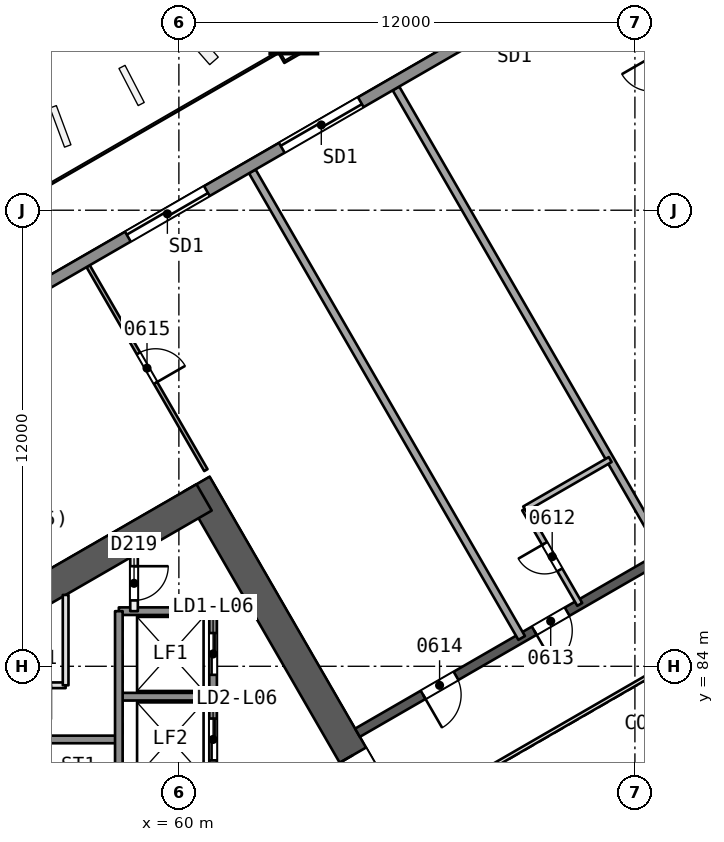
"""IFC4 building model, lengths in metres.
Left out: names, types, materials, properties, quantities, classifications, styles, units other than length and angle.
Written with IfcOpenShell. Run it as: python <this file> out.ifc"""

import sys

from ifc_helpers import new_model, si_unit, direction, frame, frame_2d, origin, origin_2d, place, context, subcontext, project, spatial, rectangle, extrude, element, fill, save


model = new_model("IFC4")
c1 = context("Model", 3, precision=1e-05, world=origin(), true_north=direction((0.0, 1.0)))
c2 = subcontext(c1, "Body", "Model", "MODEL_VIEW")
j1 = project(units=[si_unit("LENGTHUNIT", "METRE"), si_unit("PLANEANGLEUNIT", "RADIAN")], contexts=[c1])
p1 = place(None, origin())
s1 = spatial("IfcSite", under=j1, at=p1, CompositionType="ELEMENT")
p2 = place(p1, origin())
s2 = spatial("IfcBuilding", under=s1, at=p2, CompositionType="ELEMENT")
p3 = place(p2, frame((0.0, 0.0, 33.7)))
s3 = spatial("IfcBuildingStorey", under=s2, at=p3, CompositionType="ELEMENT", Elevation=33.7)
p4 = place(p3, frame((65.538, 80.0, 0.0), z_axis=(0.0, 0.0, 1.0), x_axis=(-0.49999662545, 0.866027352073, 0.0)))
e1 = element("IfcWall", 1, at=p4, inside=s3, PredefinedType="SHEAR", context=c2, shape_type="SweptSolid", body=[
    extrude(rectangle(XDim=10.149, YDim=0.8, at=frame_2d((5.074, 0.0))), origin(), (0.0, 0.0, 1.0), 3.7),
])
p5 = place(p4, frame((0.719, 0.0, 0.0)))
e2 = element("IfcOpeningElement", 2, at=p5, cuts=e1, PredefinedType="OPENING", context=c2, shape_type="SweptSolid", body=[
    extrude(rectangle(XDim=1.2, YDim=2.1, at=frame_2d((0.6, 1.05))), frame((0.0, 0.411, 0.0), z_axis=(0.0, -1.0, 0.0), x_axis=(1.0, 0.0, 0.0)), (0.0, 0.0, 1.0), 0.821),
])
p6 = place(p3, frame((60.664, 88.443, 0.0), z_axis=(0.0, 0.0, 1.0), x_axis=(-0.866029478545, -0.499992942241, 0.0)))
e3 = element("IfcWall", 3, at=p6, inside=s3, PredefinedType="SHEAR", context=c2, shape_type="SweptSolid", body=[
    extrude(rectangle(XDim=13.933, YDim=0.8, at=frame_2d((6.967, 0.0))), origin(), (0.0, 0.0, 1.0), 3.7),
])
p7 = place(p3, frame((78.2, 90.046, 0.0), z_axis=(0.0, 0.0, 1.0), x_axis=(-0.866026492143, -0.499998114903, 0.0)))
e4 = element("IfcWall", 4, at=p7, inside=s3, PredefinedType="SHEAR", context=c2, shape_type="SweptSolid", body=[
    extrude(rectangle(XDim=15.588, YDim=0.25, at=frame_2d((7.794, 0.0))), origin(), (0.0, 0.0, 1.0), 3.2),
])
p8 = place(p7, frame((2.618, 0.0, 0.0)))
e5 = element("IfcOpeningElement", 5, at=p8, cuts=e4, PredefinedType="OPENING", context=c2, shape_type="SweptSolid", body=[
    extrude(rectangle(XDim=1.0, YDim=2.1, at=frame_2d((0.5, 1.05))), frame((0.0, 0.135, 0.0), z_axis=(0.0, -1.0, 0.0), x_axis=(1.0, 0.0, 0.0)), (0.0, 0.0, 1.0), 0.271),
])
p9 = place(p7, frame((9.218, 0.0, 0.0)))
e6 = element("IfcOpeningElement", 6, at=p9, cuts=e4, PredefinedType="OPENING", context=c2, shape_type="SweptSolid", body=[
    extrude(rectangle(XDim=1.0, YDim=2.1, at=frame_2d((0.5, 1.05))), frame((0.0, 0.135, 0.0), z_axis=(0.0, -1.0, 0.0), x_axis=(1.0, 0.0, 0.0)), (0.0, 0.0, 1.0), 0.271),
])
p10 = place(p7, frame((12.594, 0.0, 0.0)))
e7 = element("IfcOpeningElement", 7, at=p10, cuts=e4, PredefinedType="OPENING", context=c2, shape_type="SweptSolid", body=[
    extrude(rectangle(XDim=1.0, YDim=2.1, at=frame_2d((0.5, 1.05))), frame((0.0, 0.135, 0.0), z_axis=(0.0, -1.0, 0.0), x_axis=(1.0, 0.0, 0.0)), (0.0, 0.0, 1.0), 0.271),
])
p11 = place(p3, frame((63.012, 100.763, 0.0), z_axis=(0.010093620709, -0.017482414954, 0.999796221231), x_axis=(0.86601685016, 0.500014815019, 2.20911e-07)))
e8 = element("IfcColumn", 8, at=p11, inside=s3, PredefinedType="COLUMN", context=c2, shape_type="SweptSolid", body=[
    extrude(rectangle(XDim=1.2, YDim=1.2, at=origin_2d()), origin(), (0.0, 0.0, 1.0), 3.701),
])
p12 = place(p3, frame((74.21, 96.956, 0.0), z_axis=(0.0, 0.0, 1.0), x_axis=(-0.499986163319, 0.866033392248, 0.0)))
e9 = element("IfcWall", 9, at=p12, inside=s3, PredefinedType="PARTITIONING", context=c2, shape_type="SweptSolid", body=[
    extrude(rectangle(XDim=6.198, YDim=0.1, at=frame_2d((3.099, 0.0))), origin(), (0.0, 0.0, 1.0), 3.2),
])
p13 = place(p12, frame((2.649, 0.0, 0.0)))
e10 = element("IfcOpeningElement", 10, at=p13, cuts=e9, PredefinedType="OPENING", context=c2, shape_type="SweptSolid", body=[
    extrude(rectangle(XDim=0.9, YDim=2.1, at=frame_2d((0.45, 1.05))), frame((0.0, 0.061, 0.0), z_axis=(0.0, -1.0, 0.0), x_axis=(1.0, 0.0, 0.0)), (0.0, 0.0, 1.0), 0.121),
])
p14 = place(p3, frame((65.712, 99.205, 0.0), z_axis=(0.0, 0.0, 1.0), x_axis=(0.499997249004, -0.866026992067, 0.0)))
e11 = element("IfcWall", 11, at=p14, inside=s3, PredefinedType="PARTITIONING", context=c2, shape_type="SweptSolid", body=[
    extrude(rectangle(XDim=14.176, YDim=0.2, at=frame_2d((7.088, 0.0))), origin(), (0.0, 0.0, 1.0), 3.2),
])
p15 = place(p3, frame((70.548, 85.628, 0.0), z_axis=(0.0, 0.0, 1.0), x_axis=(-0.499987231761, 0.866032775405, 0.0)))
e12 = element("IfcWall", 12, at=p15, inside=s3, PredefinedType="PARTITIONING", context=c2, shape_type="SweptSolid", body=[
    extrude(rectangle(XDim=2.9, YDim=0.15, at=frame_2d((1.45, 0.0))), origin(), (0.0, 0.0, 1.0), 3.2),
])
p16 = place(p15, frame((1.05, 0.0, 0.0)))
e13 = element("IfcOpeningElement", 13, at=p16, cuts=e12, PredefinedType="OPENING", context=c2, shape_type="SweptSolid", body=[
    extrude(rectangle(XDim=0.8, YDim=2.1, at=frame_2d((0.4, 1.05))), frame((0.0, 0.085, 0.0), z_axis=(0.0, -1.0, 0.0), x_axis=(1.0, 0.0, 0.0)), (0.0, 0.0, 1.0), 0.171),
])
p17 = place(p3, frame((69.098, 88.14, 0.0), z_axis=(0.0, 0.0, 1.0), x_axis=(0.866021400173, 0.500006934395, 0.0)))
e14 = element("IfcWall", 14, at=p17, inside=s3, PredefinedType="PARTITIONING", context=c2, shape_type="SweptSolid", body=[
    extrude(rectangle(XDim=2.6, YDim=0.15, at=frame_2d((1.3, 0.0))), origin(), (0.0, 0.0, 1.0), 3.2),
])
p18 = place(p3, frame((61.932, 97.023, 0.0), z_axis=(0.0, 0.0, 1.0), x_axis=(0.499997249004, -0.866026992067, 0.0)))
e15 = element("IfcWall", 15, at=p18, inside=s3, PredefinedType="PARTITIONING", context=c2, shape_type="SweptSolid", body=[
    extrude(rectangle(XDim=14.176, YDim=0.2, at=frame_2d((7.088, 0.0))), origin(), (0.0, 0.0, 1.0), 3.2),
])
p19 = place(p3, frame((57.612, 94.529, 0.0), z_axis=(0.0, 0.0, 1.0), x_axis=(0.499986163319, -0.866033392248, 0.0)))
e16 = element("IfcWall", 16, at=p19, inside=s3, PredefinedType="PARTITIONING", context=c2, shape_type="SweptSolid", body=[
    extrude(rectangle(XDim=6.198, YDim=0.1, at=frame_2d((3.099, 0.0))), origin(), (0.0, 0.0, 1.0), 3.2),
])
p20 = place(p19, frame((2.649, 0.0, 0.0)))
e17 = element("IfcOpeningElement", 17, at=p20, cuts=e16, PredefinedType="OPENING", context=c2, shape_type="SweptSolid", body=[
    extrude(rectangle(XDim=0.9, YDim=2.1, at=frame_2d((0.45, 1.05))), frame((0.0, 0.061, 0.0), z_axis=(0.0, -1.0, 0.0), x_axis=(1.0, 0.0, 0.0)), (0.0, 0.0, 1.0), 0.121),
])
p21 = place(p3, frame((37.61, 83.152, 0.0), z_axis=(0.0, 0.0, 1.0), x_axis=(0.866024438126, 0.500001672566, 0.0)))
e18 = element("IfcWall", 18, at=p21, inside=s3, PredefinedType="SOLIDWALL", context=c2, shape_type="SweptSolid", body=[
    extrude(rectangle(XDim=61.61, YDim=0.3, at=frame_2d((30.805, 0.0))), origin(), (0.0, 0.0, 1.0), 3.2),
])
p22 = place(p21, frame((34.281, 0.0, 0.0)))
e19 = element("IfcOpeningElement", 19, at=p22, cuts=e18, PredefinedType="OPENING", context=c2, shape_type="SweptSolid", body=[
    extrude(rectangle(XDim=2.4, YDim=2.4, at=frame_2d((1.2, 1.2))), frame((0.0, 0.161, 0.0), z_axis=(0.0, -1.0, 0.0), x_axis=(1.0, 0.0, 0.0)), (0.0, 0.0, 1.0), 0.321),
])
p23 = place(p21, frame((47.767, 0.0, 0.0)))
e20 = element("IfcOpeningElement", 20, at=p23, cuts=e18, PredefinedType="OPENING", context=c2, shape_type="SweptSolid", body=[
    extrude(rectangle(XDim=2.4, YDim=2.4, at=frame_2d((1.2, 1.2))), frame((0.0, 0.161, 0.0), z_axis=(0.0, -1.0, 0.0), x_axis=(1.0, 0.0, 0.0)), (0.0, 0.0, 1.0), 0.321),
])
p24 = place(p21, frame((24.305, 0.0, 0.0)))
e21 = element("IfcOpeningElement", 21, at=p24, cuts=e18, PredefinedType="OPENING", context=c2, shape_type="SweptSolid", body=[
    extrude(rectangle(XDim=2.4, YDim=2.4, at=frame_2d((1.2, 1.2))), frame((0.0, 0.161, 0.0), z_axis=(0.0, -1.0, 0.0), x_axis=(1.0, 0.0, 0.0)), (0.0, 0.0, 1.0), 0.321),
])
p25 = place(p21, frame((11.402, 0.0, 0.0)))
e22 = element("IfcOpeningElement", 22, at=p25, cuts=e18, PredefinedType="OPENING", context=c2, shape_type="SweptSolid", body=[
    extrude(rectangle(XDim=2.4, YDim=2.4, at=frame_2d((1.2, 1.2))), frame((0.0, 0.161, 0.0), z_axis=(0.0, -1.0, 0.0), x_axis=(1.0, 0.0, 0.0)), (0.0, 0.0, 1.0), 0.321),
])
p26 = place(p21, frame((28.981, 0.0, 0.0)))
e23 = element("IfcOpeningElement", 23, at=p26, cuts=e18, PredefinedType="OPENING", context=c2, shape_type="SweptSolid", body=[
    extrude(rectangle(XDim=2.4, YDim=2.4, at=frame_2d((1.2, 1.2))), frame((0.0, 0.161, 0.0), z_axis=(0.0, -1.0, 0.0), x_axis=(1.0, 0.0, 0.0)), (0.0, 0.0, 1.0), 0.321),
])
p27 = place(p3, frame((60.9, 85.45, 0.0), z_axis=(0.0, 0.0, 1.0), x_axis=(-1.0, 0.0, 0.0)))
e24 = element("IfcWall", 24, at=p27, inside=s3, PredefinedType="SOLIDWALL", context=c2, shape_type="SweptSolid", body=[
    extrude(rectangle(XDim=2.48, YDim=0.2, at=frame_2d((1.24, 0.0))), origin(), (0.0, 0.0, 1.0), 3.2),
])
p28 = place(p3, frame((57.02, 83.5, 0.0), z_axis=(0.0, 0.0, 1.0), x_axis=(-1.0, 0.0, 0.0)))
e25 = element("IfcWall", 25, at=p28, inside=s3, PredefinedType="PARTITIONING", context=c2, shape_type="SweptSolid", body=[
    extrude(rectangle(XDim=1.6, YDim=0.15, at=frame_2d((0.8, 0.0))), origin(), (0.0, 0.0, 1.0), 3.2),
])
p29 = place(p28, frame((0.387, 0.0, 0.0)))
e26 = element("IfcOpeningElement", 26, at=p29, cuts=e25, PredefinedType="OPENING", context=c2, shape_type="SweptSolid", body=[
    extrude(rectangle(XDim=0.9, YDim=2.1, at=frame_2d((0.45, 1.05))), frame((0.0, 0.085, 0.0), z_axis=(0.0, -1.0, 0.0), x_axis=(1.0, 0.0, 0.0)), (0.0, 0.0, 1.0), 0.171),
])
p30 = place(p3, frame((60.9, 83.2, 0.0), z_axis=(0.0, 0.0, 1.0), x_axis=(-1.0, 0.0, 0.0)))
e27 = element("IfcWall", 27, at=p30, inside=s3, PredefinedType="SOLIDWALL", context=c2, shape_type="SweptSolid", body=[
    extrude(rectangle(XDim=2.48, YDim=0.2, at=frame_2d((1.24, 0.0))), origin(), (0.0, 0.0, 1.0), 3.2),
])
p31 = place(p3, frame((58.42, 82.075, 0.0), z_axis=(0.0, 0.0, 1.0), x_axis=(-1.0, 0.0, 0.0)))
e28 = element("IfcWall", 28, at=p31, inside=s3, PredefinedType="SOLIDWALL", context=c2, shape_type="SweptSolid", body=[
    extrude(rectangle(XDim=7.7, YDim=0.2, at=frame_2d((3.85, 0.0))), origin(), (0.0, 0.0, 1.0), 3.2),
])
p32 = place(p3, frame((60.9, 85.45, 0.0), z_axis=(0.0, 0.0, 1.0), x_axis=(0.0, -1.0, 0.0)))
e29 = element("IfcWall", 29, at=p32, inside=s3, PredefinedType="SOLIDWALL", context=c2, shape_type="SweptSolid", body=[
    extrude(rectangle(XDim=10.9, YDim=0.2, at=frame_2d((5.45, 0.0))), origin(), (0.0, 0.0, 1.0), 3.2),
])
p33 = place(p32, frame((0.575, 0.0, 0.0)))
e30 = element("IfcOpeningElement", 30, at=p33, cuts=e29, PredefinedType="OPENING", context=c2, shape_type="SweptSolid", body=[
    extrude(rectangle(XDim=1.1, YDim=2.1, at=frame_2d((0.55, 1.05))), frame((0.0, 0.11, 0.0), z_axis=(0.0, -1.0, 0.0), x_axis=(1.0, 0.0, 0.0)), (0.0, 0.0, 1.0), 0.221),
])
p34 = place(p32, frame((2.825, 0.0, 0.0)))
e31 = element("IfcOpeningElement", 31, at=p34, cuts=e29, PredefinedType="OPENING", context=c2, shape_type="SweptSolid", body=[
    extrude(rectangle(XDim=1.1, YDim=2.1, at=frame_2d((0.55, 1.05))), frame((0.0, 0.11, 0.0), z_axis=(0.0, -1.0, 0.0), x_axis=(1.0, 0.0, 0.0)), (0.0, 0.0, 1.0), 0.221),
])
p35 = place(p32, frame((5.075, 0.0, 0.0)))
e32 = element("IfcOpeningElement", 32, at=p35, cuts=e29, PredefinedType="OPENING", context=c2, shape_type="SweptSolid", body=[
    extrude(rectangle(XDim=1.1, YDim=2.1, at=frame_2d((0.55, 1.05))), frame((0.0, 0.11, 0.0), z_axis=(0.0, -1.0, 0.0), x_axis=(1.0, 0.0, 0.0)), (0.0, 0.0, 1.0), 0.221),
])
p36 = place(p32, frame((7.325, 0.0, 0.0)))
e33 = element("IfcOpeningElement", 33, at=p36, cuts=e29, PredefinedType="OPENING", context=c2, shape_type="SweptSolid", body=[
    extrude(rectangle(XDim=1.1, YDim=2.1, at=frame_2d((0.55, 1.05))), frame((0.0, 0.11, 0.0), z_axis=(0.0, -1.0, 0.0), x_axis=(1.0, 0.0, 0.0)), (0.0, 0.0, 1.0), 0.221),
])
p37 = place(p3, frame((58.82, 86.917, 0.0), z_axis=(0.0, 0.0, 1.0), x_axis=(0.0, -1.0, 0.0)))
e34 = element("IfcWall", 34, at=p37, inside=s3, PredefinedType="PARTITIONING", context=c2, shape_type="SweptSolid", body=[
    extrude(rectangle(XDim=1.467, YDim=0.2, at=frame_2d((0.733, 0.0))), origin(), (0.0, 0.0, 1.0), 3.2),
])
p38 = place(p37, frame((0.283, 0.0, 0.0)))
e35 = element("IfcOpeningElement", 35, at=p38, cuts=e34, PredefinedType="OPENING", context=c2, shape_type="SweptSolid", body=[
    extrude(rectangle(XDim=0.9, YDim=2.1, at=frame_2d((0.45, 1.05))), frame((0.0, 0.11, 0.0), z_axis=(0.0, -1.0, 0.0), x_axis=(1.0, 0.0, 0.0)), (0.0, 0.0, 1.0), 0.221),
])
p39 = place(p3, frame((58.42, 85.45, 0.0), z_axis=(0.0, 0.0, 1.0), x_axis=(0.0, -1.0, 0.0)))
e36 = element("IfcWall", 36, at=p39, inside=s3, PredefinedType="SOLIDWALL", context=c2, shape_type="SweptSolid", body=[
    extrude(rectangle(XDim=9.0, YDim=0.2, at=frame_2d((4.5, 0.0))), origin(), (0.0, 0.0, 1.0), 3.2),
])
p40 = place(p3, frame((57.02, 85.877, 0.0), z_axis=(0.0, 0.0, 1.0), x_axis=(0.0, -1.0, 0.0)))
e37 = element("IfcWall", 37, at=p40, inside=s3, PredefinedType="PARTITIONING", context=c2, shape_type="SweptSolid", body=[
    extrude(rectangle(XDim=2.377, YDim=0.15, at=frame_2d((1.189, 0.0))), origin(), (0.0, 0.0, 1.0), 3.2),
])
p41 = place(p3, frame((77.738, 86.846, 0.0), z_axis=(0.0, 0.0, 1.0), x_axis=(-0.866026658274, -0.499997827154, 0.0)))
e38 = element("IfcWall", 38, at=p41, inside=s3, PredefinedType="PARTITIONING", context=c2, shape_type="SweptSolid", body=[
    extrude(rectangle(XDim=11.588, YDim=0.1, at=frame_2d((5.794, 0.0))), origin(), (0.0, 0.0, 1.0), 3.2),
])
p42 = place(p16, origin())
e39 = element("IfcDoor", 39, at=p42, inside=s3, OperationType="SINGLE_SWING_RIGHT", PredefinedType="NOTDEFINED", context=c2, shape_type="SweptSolid", body=[
    extrude(rectangle(XDim=0.8, YDim=2.1, at=frame_2d((0.4, 1.05))), frame((0.0, 0.025, 0.0), z_axis=(0.0, -1.0, 0.0), x_axis=(1.0, 0.0, 0.0)), (0.0, 0.0, 1.0), 0.05),
])
fill(e13, e39)
p43 = place(p9, origin())
e40 = element("IfcDoor", 40, at=p43, inside=s3, OperationType="SINGLE_SWING_RIGHT", PredefinedType="NOTDEFINED", context=c2, shape_type="SweptSolid", body=[
    extrude(rectangle(XDim=1.0, YDim=2.1, at=frame_2d((0.5, 1.05))), frame((0.0, 0.025, 0.0), z_axis=(0.0, -1.0, 0.0), x_axis=(1.0, 0.0, 0.0)), (0.0, 0.0, 1.0), 0.05),
])
fill(e6, e40)
p44 = place(p10, origin())
e41 = element("IfcDoor", 41, at=p44, inside=s3, OperationType="SINGLE_SWING_RIGHT", PredefinedType="NOTDEFINED", context=c2, shape_type="SweptSolid", body=[
    extrude(rectangle(XDim=1.0, YDim=2.1, at=frame_2d((0.5, 1.05))), frame((0.0, 0.025, 0.0), z_axis=(0.0, -1.0, 0.0), x_axis=(1.0, 0.0, 0.0)), (0.0, 0.0, 1.0), 0.05),
])
fill(e7, e41)
p45 = place(p20, origin())
e42 = element("IfcDoor", 42, at=p45, inside=s3, OperationType="SINGLE_SWING_RIGHT", PredefinedType="NOTDEFINED", context=c2, shape_type="SweptSolid", body=[
    extrude(rectangle(XDim=0.9, YDim=2.1, at=frame_2d((0.45, 1.05))), frame((0.0, 0.025, 0.0), z_axis=(0.0, -1.0, 0.0), x_axis=(1.0, 0.0, 0.0)), (0.0, 0.0, 1.0), 0.05),
])
fill(e17, e42)
p46 = place(p24, origin())
e43 = element("IfcDoor", 43, at=p46, inside=s3, OperationType="SLIDING_TO_LEFT", PredefinedType="NOTDEFINED", context=c2, shape_type="SweptSolid", body=[
    extrude(rectangle(XDim=2.4, YDim=2.4, at=frame_2d((1.2, 1.2))), frame((0.0, 0.025, 0.0), z_axis=(0.0, -1.0, 0.0), x_axis=(1.0, 0.0, 0.0)), (0.0, 0.0, 1.0), 0.05),
])
fill(e21, e43)
p47 = place(p26, origin())
e44 = element("IfcDoor", 44, at=p47, inside=s3, OperationType="SLIDING_TO_LEFT", PredefinedType="NOTDEFINED", context=c2, shape_type="SweptSolid", body=[
    extrude(rectangle(XDim=2.4, YDim=2.4, at=frame_2d((1.2, 1.2))), frame((0.0, 0.025, 0.0), z_axis=(0.0, -1.0, 0.0), x_axis=(1.0, 0.0, 0.0)), (0.0, 0.0, 1.0), 0.05),
])
fill(e23, e44)
p48 = place(p5, origin())
e45 = element("IfcDoor", 45, at=p48, inside=s3, OperationType="SINGLE_SWING_RIGHT", PredefinedType="NOTDEFINED", context=c2, shape_type="SweptSolid", body=[
    extrude(rectangle(XDim=1.2, YDim=2.1, at=frame_2d((0.6, 1.05))), frame((0.0, 0.025, 0.0), z_axis=(0.0, -1.0, 0.0), x_axis=(1.0, 0.0, 0.0)), (0.0, 0.0, 1.0), 0.05),
])
fill(e2, e45)
p49 = place(p33, origin())
e46 = element("IfcDoor", 46, at=p49, inside=s3, OperationType="SLIDING_TO_RIGHT", PredefinedType="NOTDEFINED", context=c2, shape_type="SweptSolid", body=[
    extrude(rectangle(XDim=1.1, YDim=2.1, at=frame_2d((0.55, 1.05))), frame((0.0, 0.025, 0.0), z_axis=(0.0, -1.0, 0.0), x_axis=(1.0, 0.0, 0.0)), (0.0, 0.0, 1.0), 0.05),
])
fill(e30, e46)
p50 = place(p34, origin())
e47 = element("IfcDoor", 47, at=p50, inside=s3, OperationType="SLIDING_TO_LEFT", PredefinedType="NOTDEFINED", context=c2, shape_type="SweptSolid", body=[
    extrude(rectangle(XDim=1.1, YDim=2.1, at=frame_2d((0.55, 1.05))), frame((0.0, 0.025, 0.0), z_axis=(0.0, -1.0, 0.0), x_axis=(1.0, 0.0, 0.0)), (0.0, 0.0, 1.0), 0.05),
])
fill(e31, e47)
p51 = place(p38, origin())
e48 = element("IfcDoor", 48, at=p51, inside=s3, OperationType="SINGLE_SWING_LEFT", PredefinedType="NOTDEFINED", context=c2, shape_type="SweptSolid", body=[
    extrude(rectangle(XDim=0.9, YDim=2.1, at=frame_2d((0.45, 1.05))), frame((0.0, 0.025, 0.0), z_axis=(0.0, -1.0, 0.0), x_axis=(1.0, 0.0, 0.0)), (0.0, 0.0, 1.0), 0.05),
])
fill(e35, e48)
save(model, sys.argv[1])
